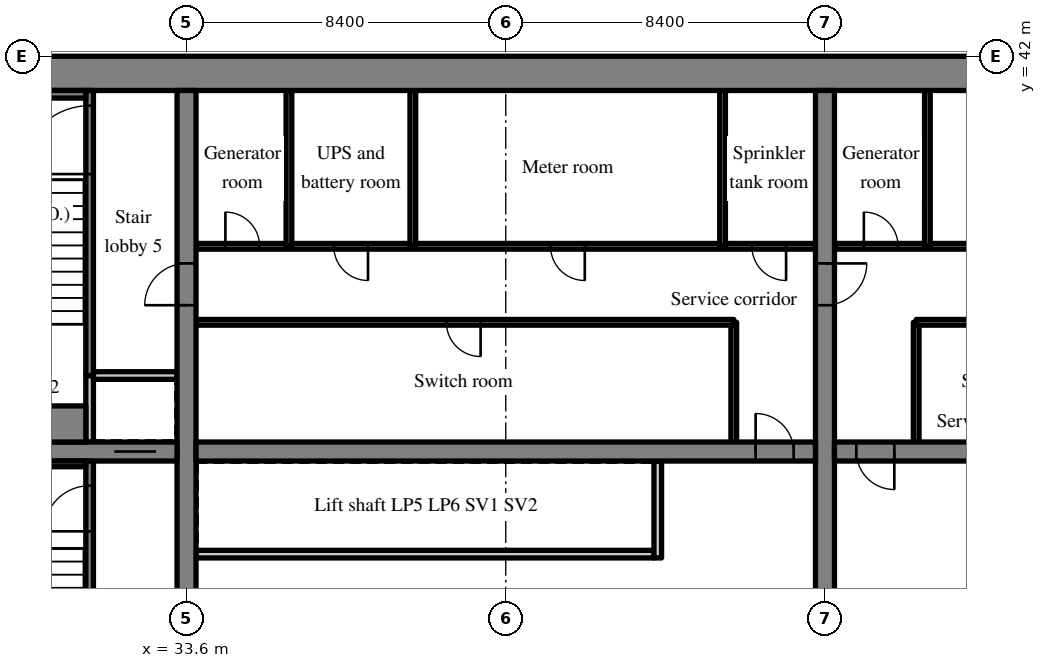
"""IFC4 building model, lengths in metres.
Left out: names, types, materials, properties, quantities, classifications, styles, units other than length and angle.
Written with IfcOpenShell. Run it as: python <this file> out.ifc"""

import sys

from ifc_helpers import new_model, si_unit, direction, frame, frame_2d, origin, place, context, subcontext, project, spatial, rectangle, extrude, source, transform, mapped, element, fill, save


model = new_model("IFC4")
c1 = context("Model", 3, precision=1e-05, world=origin(), true_north=direction((0.0, 1.0)))
c2 = subcontext(c1, "Body", "Model", "MODEL_VIEW")
j1 = project(units=[si_unit("LENGTHUNIT", "METRE"), si_unit("PLANEANGLEUNIT", "RADIAN")], contexts=[c1])
p1 = place(None, origin())
s1 = spatial("IfcSite", under=j1, at=p1, CompositionType="ELEMENT")
p2 = place(p1, origin())
s2 = spatial("IfcBuilding", under=s1, at=p2, CompositionType="ELEMENT")
p3 = place(p2, frame((0.0, 0.0, 140.8)))
s3 = spatial("IfcBuildingStorey", under=s2, at=p3, CompositionType="ELEMENT", Elevation=140.8)
m1 = source(origin(), c2, "Body", "SweptSolid", [
    extrude(rectangle(XDim=50.4, YDim=0.9, at=frame_2d((25.2, 0.0))), origin(), (0.0, 0.0, 1.0), 5.12),
])
p4 = place(p3, frame((25.2, 41.55, 0.0), z_axis=(0.0, 0.0, 1.0), x_axis=(1.0, 0.0, 0.0)))
e1 = element("IfcWall", 1, at=p4, inside=s3, PredefinedType="SHEAR", context=c2, shape_type="MappedRepresentation", body=[
    mapped(m1, transform((0.0, 0.0, 0.0), scale=1.0)),
])
m2 = source(origin(), c2, "Body", "SweptSolid", [
    extrude(rectangle(XDim=18.2, YDim=0.5, at=frame_2d((9.1, 0.0))), origin(), (0.0, 0.0, 1.0), 5.12),
])
p5 = place(p3, frame((33.6, 22.9, 0.0), z_axis=(0.0, 0.0, 1.0), x_axis=(0.0, 1.0, 0.0)))
e2 = element("IfcWall", 2, at=p5, inside=s3, PredefinedType="SHEAR", context=c2, shape_type="MappedRepresentation", body=[
    mapped(m2, transform((0.0, 0.0, 0.0), scale=1.0)),
])
m3 = source(origin(), c2, "Body", "SweptSolid", [
    extrude(rectangle(XDim=1.1, YDim=2.1, at=frame_2d((0.55, 1.05))), frame((0.0, 0.26, 0.0), z_axis=(0.0, -1.0, 0.0), x_axis=(1.0, 0.0, 0.0)), (0.0, 0.0, 1.0), 0.52),
])
p6 = place(p5, frame((12.55, 0.0, 0.0)))
e3 = element("IfcOpeningElement", 3, at=p6, cuts=e2, PredefinedType="OPENING", context=c2, shape_type="MappedRepresentation", body=[
    mapped(m3, transform((0.0, 0.0, 0.0), scale=1.0)),
])
p7 = place(p3, frame((50.4, 22.9, 0.0), z_axis=(0.0, 0.0, 1.0), x_axis=(0.0, 1.0, 0.0)))
e4 = element("IfcWall", 4, at=p7, inside=s3, PredefinedType="SHEAR", context=c2, shape_type="MappedRepresentation", body=[
    mapped(m2, transform((0.0, 0.0, 0.0), scale=1.0)),
])
p8 = place(p7, frame((12.55, 0.0, 0.0)))
e5 = element("IfcOpeningElement", 5, at=p8, cuts=e4, PredefinedType="OPENING", context=c2, shape_type="MappedRepresentation", body=[
    mapped(m3, transform((0.0, 0.0, 0.0), scale=1.0)),
])
m4 = source(origin(), c2, "Body", "SweptSolid", [
    extrude(rectangle(XDim=7.25, YDim=0.5, at=frame_2d((3.625, 0.0))), origin(), (0.0, 0.0, 1.0), 5.12),
])
p9 = place(p3, frame((26.1, 31.6, 0.0), z_axis=(0.0, 0.0, 1.0), x_axis=(1.0, 0.0, 0.0)))
e6 = element("IfcWall", 6, at=p9, inside=s3, PredefinedType="SHEAR", context=c2, shape_type="MappedRepresentation", body=[
    mapped(m4, transform((0.0, 0.0, 0.0), scale=1.0)),
])
p10 = place(p9, frame((5.6, 0.0, 0.0)))
e7 = element("IfcOpeningElement", 7, at=p10, cuts=e6, PredefinedType="OPENING", context=c2, shape_type="MappedRepresentation", body=[
    mapped(m3, transform((0.0, 0.0, 0.0), scale=1.0)),
])
m5 = source(origin(), c2, "Body", "SweptSolid", [
    extrude(rectangle(XDim=16.3, YDim=0.5, at=frame_2d((8.15, 0.0))), origin(), (0.0, 0.0, 1.0), 5.12),
])
p11 = place(p3, frame((33.85, 31.6, 0.0), z_axis=(0.0, 0.0, 1.0), x_axis=(1.0, 0.0, 0.0)))
e8 = element("IfcWall", 8, at=p11, inside=s3, PredefinedType="SHEAR", context=c2, shape_type="MappedRepresentation", body=[
    mapped(m5, transform((0.0, 0.0, 0.0), scale=1.0)),
])
m6 = source(origin(), c2, "Body", "SweptSolid", [
    extrude(rectangle(XDim=1.0, YDim=2.1, at=frame_2d((0.5, 1.05))), frame((0.0, 0.26, 0.0), z_axis=(0.0, -1.0, 0.0), x_axis=(1.0, 0.0, 0.0)), (0.0, 0.0, 1.0), 0.52),
])
p12 = place(p11, frame((14.725, 0.0, 0.0)))
e9 = element("IfcOpeningElement", 9, at=p12, cuts=e8, PredefinedType="OPENING", context=c2, shape_type="MappedRepresentation", body=[
    mapped(m6, transform((0.0, 0.0, 0.0), scale=1.0)),
])
m7 = source(origin(), c2, "Body", "SweptSolid", [
    extrude(rectangle(XDim=16.3, YDim=0.5, at=frame_2d((8.15, 0.0))), origin(), (0.0, 0.0, 1.0), 5.12),
])
p13 = place(p3, frame((50.65, 31.6, 0.0), z_axis=(0.0, 0.0, 1.0), x_axis=(1.0, 0.0, 0.0)))
e10 = element("IfcWall", 10, at=p13, inside=s3, PredefinedType="SHEAR", context=c2, shape_type="MappedRepresentation", body=[
    mapped(m7, transform((0.0, 0.0, 0.0), scale=1.0)),
])
p14 = place(p13, frame((0.575, 0.0, 0.0)))
e11 = element("IfcOpeningElement", 11, at=p14, cuts=e10, PredefinedType="OPENING", context=c2, shape_type="MappedRepresentation", body=[
    mapped(m6, transform((0.0, 0.0, 0.0), scale=1.0)),
])
m8 = source(origin(), c2, "Body", "SweptSolid", [
    extrude(rectangle(XDim=12.05, YDim=0.2, at=frame_2d((6.025, 0.0))), origin(), (0.0, 0.0, 1.0), 5.12),
])
p15 = place(p3, frame((33.85, 28.9, 0.0), z_axis=(0.0, 0.0, 1.0), x_axis=(1.0, 0.0, 0.0)))
e12 = element("IfcWall", 12, at=p15, inside=s3, PredefinedType="SOLIDWALL", context=c2, shape_type="MappedRepresentation", body=[
    mapped(m8, transform((0.0, 0.0, 0.0), scale=1.0)),
])
m9 = source(origin(), c2, "Body", "SweptSolid", [
    extrude(rectangle(XDim=2.55, YDim=0.2, at=frame_2d((1.275, 0.0))), origin(), (0.0, 0.0, 1.0), 5.12),
])
p16 = place(p3, frame((46.0, 28.8, 0.0), z_axis=(0.0, 0.0, 1.0), x_axis=(0.0, 1.0, 0.0)))
e13 = element("IfcWall", 13, at=p16, inside=s3, PredefinedType="SOLIDWALL", context=c2, shape_type="MappedRepresentation", body=[
    mapped(m9, transform((0.0, 0.0, 0.0), scale=1.0)),
])
m10 = source(origin(), c2, "Body", "SweptSolid", [
    extrude(rectangle(XDim=3.15, YDim=0.15, at=frame_2d((1.575, 0.0))), origin(), (0.0, 0.0, 1.0), 5.12),
])
p17 = place(p3, frame((48.0, 31.85, 0.0), z_axis=(0.0, 0.0, 1.0), x_axis=(0.0, 1.0, 0.0)))
e14 = element("IfcWall", 14, at=p17, inside=s3, PredefinedType="PARTITIONING", context=c2, shape_type="MappedRepresentation", body=[
    mapped(m10, transform((0.0, 0.0, 0.0), scale=1.0)),
])
m11 = source(origin(), c2, "Body", "SweptSolid", [
    extrude(rectangle(XDim=14.15, YDim=0.15, at=frame_2d((7.075, 0.0))), origin(), (0.0, 0.0, 1.0), 5.12),
])
p18 = place(p3, frame((33.85, 35.0, 0.0), z_axis=(0.0, 0.0, 1.0), x_axis=(1.0, 0.0, 0.0)))
e15 = element("IfcWall", 15, at=p18, inside=s3, PredefinedType="PARTITIONING", context=c2, shape_type="MappedRepresentation", body=[
    mapped(m11, transform((0.0, 0.0, 0.0), scale=1.0)),
])
m12 = source(origin(), c2, "Body", "SweptSolid", [
    extrude(rectangle(XDim=0.9, YDim=2.1, at=frame_2d((0.45, 1.05))), frame((0.0, 0.085, 0.0), z_axis=(0.0, -1.0, 0.0), x_axis=(1.0, 0.0, 0.0)), (0.0, 0.0, 1.0), 0.17),
])
p19 = place(p18, frame((6.588, 0.0, 0.0)))
e16 = element("IfcOpeningElement", 16, at=p19, cuts=e15, PredefinedType="OPENING", context=c2, shape_type="MappedRepresentation", body=[
    mapped(m12, transform((0.0, 0.0, 0.0), scale=1.0)),
])
m13 = source(origin(), c2, "Body", "SweptSolid", [
    extrude(rectangle(XDim=16.3, YDim=0.15, at=frame_2d((8.15, 0.0))), origin(), (0.0, 0.0, 1.0), 5.12),
])
p20 = place(p3, frame((33.85, 37.0, 0.0), z_axis=(0.0, 0.0, 1.0), x_axis=(1.0, 0.0, 0.0)))
e17 = element("IfcWall", 17, at=p20, inside=s3, PredefinedType="PARTITIONING", context=c2, shape_type="MappedRepresentation", body=[
    mapped(m13, transform((0.0, 0.0, 0.0), scale=1.0)),
])
p21 = place(p20, frame((0.773, 0.0, 0.0)))
e18 = element("IfcOpeningElement", 18, at=p21, cuts=e17, PredefinedType="OPENING", context=c2, shape_type="MappedRepresentation", body=[
    mapped(m12, transform((0.0, 0.0, 0.0), scale=1.0)),
])
p22 = place(p20, frame((3.625, 0.0, 0.0)))
e19 = element("IfcOpeningElement", 19, at=p22, cuts=e17, PredefinedType="OPENING", context=c2, shape_type="MappedRepresentation", body=[
    mapped(m12, transform((0.0, 0.0, 0.0), scale=1.0)),
])
p23 = place(p20, frame((9.33, 0.0, 0.0)))
e20 = element("IfcOpeningElement", 20, at=p23, cuts=e17, PredefinedType="OPENING", context=c2, shape_type="MappedRepresentation", body=[
    mapped(m12, transform((0.0, 0.0, 0.0), scale=1.0)),
])
p24 = place(p20, frame((14.627, 0.0, 0.0)))
e21 = element("IfcOpeningElement", 21, at=p24, cuts=e17, PredefinedType="OPENING", context=c2, shape_type="MappedRepresentation", body=[
    mapped(m12, transform((0.0, 0.0, 0.0), scale=1.0)),
])
m14 = source(origin(), c2, "Body", "SweptSolid", [
    extrude(rectangle(XDim=4.1, YDim=0.15, at=frame_2d((2.05, 0.0))), origin(), (0.0, 0.0, 1.0), 5.12),
])
for number, where, z_axis, x_axis in (
    (22, (36.295, 37.0, 0.0), (0.0, 0.0, 1.0), (0.0, 1.0, 0.0)),
    (23, (39.555, 37.0, 0.0), (0.0, 0.0, 1.0), (0.0, 1.0, 0.0)),
    (24, (47.705, 37.0, 0.0), (0.0, 0.0, 1.0), (0.0, 1.0, 0.0)),
):
    element("IfcWall", number, at=place(p3, frame(where, z_axis=z_axis, x_axis=x_axis)), inside=s3, PredefinedType="PARTITIONING", context=c2, shape_type="MappedRepresentation", body=[
        mapped(m14, transform((0.0, 0.0, 0.0), scale=1.0)),
    ])
p25 = place(p3, frame((52.8, 31.85, 0.0), z_axis=(0.0, 0.0, 1.0), x_axis=(0.0, 1.0, 0.0)))
e25 = element("IfcWall", 25, at=p25, inside=s3, PredefinedType="PARTITIONING", context=c2, shape_type="MappedRepresentation", body=[
    mapped(m10, transform((0.0, 0.0, 0.0), scale=1.0)),
])
p26 = place(p3, frame((66.95, 35.0, 0.0), z_axis=(0.0, 0.0, 1.0), x_axis=(-1.0, 0.0, 0.0)))
e26 = element("IfcWall", 26, at=p26, inside=s3, PredefinedType="PARTITIONING", context=c2, shape_type="MappedRepresentation", body=[
    mapped(m11, transform((0.0, 0.0, 0.0), scale=1.0)),
])
p27 = place(p26, frame((3.421, 0.0, 0.0)))
e27 = element("IfcOpeningElement", 27, at=p27, cuts=e26, PredefinedType="OPENING", context=c2, shape_type="MappedRepresentation", body=[
    mapped(m12, transform((0.0, 0.0, 0.0), scale=1.0)),
])
p28 = place(p26, frame((10.458, 0.0, 0.0)))
e28 = element("IfcOpeningElement", 28, at=p28, cuts=e26, PredefinedType="OPENING", context=c2, shape_type="MappedRepresentation", body=[
    mapped(m12, transform((0.0, 0.0, 0.0), scale=1.0)),
])
m15 = source(origin(), c2, "Body", "SweptSolid", [
    extrude(rectangle(XDim=16.3, YDim=0.15, at=frame_2d((8.15, 0.0))), origin(), (0.0, 0.0, 1.0), 5.12),
])
p29 = place(p3, frame((66.95, 37.0, 0.0), z_axis=(0.0, 0.0, 1.0), x_axis=(-1.0, 0.0, 0.0)))
e29 = element("IfcWall", 29, at=p29, inside=s3, PredefinedType="PARTITIONING", context=c2, shape_type="MappedRepresentation", body=[
    mapped(m15, transform((0.0, 0.0, 0.0), scale=1.0)),
])
p30 = place(p29, frame((6.478, 0.0, 0.0)))
e30 = element("IfcOpeningElement", 30, at=p30, cuts=e29, PredefinedType="OPENING", context=c2, shape_type="MappedRepresentation", body=[
    mapped(m12, transform((0.0, 0.0, 0.0), scale=1.0)),
])
p31 = place(p29, frame((14.627, 0.0, 0.0)))
e31 = element("IfcOpeningElement", 31, at=p31, cuts=e29, PredefinedType="OPENING", context=c2, shape_type="MappedRepresentation", body=[
    mapped(m12, transform((0.0, 0.0, 0.0), scale=1.0)),
])
p32 = place(p3, frame((53.095, 37.0, 0.0), z_axis=(0.0, 0.0, 1.0), x_axis=(0.0, 1.0, 0.0)))
e32 = element("IfcWall", 32, at=p32, inside=s3, PredefinedType="PARTITIONING", context=c2, shape_type="MappedRepresentation", body=[
    mapped(m14, transform((0.0, 0.0, 0.0), scale=1.0)),
])
m16 = source(origin(), c2, "Body", "SweptSolid", [
    extrude(rectangle(XDim=8.45, YDim=0.2, at=frame_2d((4.225, 0.0))), origin(), (0.0, 0.0, 1.0), 5.12),
])
p33 = place(p3, frame((31.05, 22.9, 0.0), z_axis=(0.0, 0.0, 1.0), x_axis=(0.0, 1.0, 0.0)))
e33 = element("IfcWall", 33, at=p33, inside=s3, PredefinedType="SOLIDWALL", context=c2, shape_type="MappedRepresentation", body=[
    mapped(m16, transform((0.0, 0.0, 0.0), scale=1.0)),
])
m17 = source(origin(), c2, "Body", "SweptSolid", [
    extrude(rectangle(XDim=1.2, YDim=2.1, at=frame_2d((0.6, 1.05))), frame((0.0, 0.11, 0.0), z_axis=(0.0, -1.0, 0.0), x_axis=(1.0, 0.0, 0.0)), (0.0, 0.0, 1.0), 0.22),
])
p34 = place(p33, frame((6.6, 0.0, 0.0)))
e34 = element("IfcOpeningElement", 34, at=p34, cuts=e33, PredefinedType="OPENING", context=c2, shape_type="MappedRepresentation", body=[
    mapped(m17, transform((0.0, 0.0, 0.0), scale=1.0)),
])
m18 = source(origin(), c2, "Body", "SweptSolid", [
    extrude(rectangle(XDim=1.75, YDim=0.2, at=frame_2d((0.875, 0.0))), origin(), (0.0, 0.0, 1.0), 5.12),
])
p35 = place(p3, frame((31.05, 31.85, 0.0), z_axis=(0.0, 0.0, 1.0), x_axis=(0.0, 1.0, 0.0)))
e35 = element("IfcWall", 35, at=p35, inside=s3, PredefinedType="SOLIDWALL", context=c2, shape_type="MappedRepresentation", body=[
    mapped(m18, transform((0.0, 0.0, 0.0), scale=1.0)),
])
m19 = source(origin(), c2, "Body", "SweptSolid", [
    extrude(rectangle(XDim=2.2, YDim=0.2, at=frame_2d((1.1, 0.0))), origin(), (0.0, 0.0, 1.0), 5.12),
])
p36 = place(p3, frame((31.15, 33.6, 0.0), z_axis=(0.0, 0.0, 1.0), x_axis=(1.0, 0.0, 0.0)))
e36 = element("IfcWall", 36, at=p36, inside=s3, PredefinedType="SOLIDWALL", context=c2, shape_type="MappedRepresentation", body=[
    mapped(m19, transform((0.0, 0.0, 0.0), scale=1.0)),
])
m20 = source(origin(), c2, "Body", "SweptSolid", [
    extrude(rectangle(XDim=7.5, YDim=0.2, at=frame_2d((3.75, 0.0))), origin(), (0.0, 0.0, 1.0), 5.12),
])
p37 = place(p3, frame((31.05, 33.6, 0.0), z_axis=(0.0, 0.0, 1.0), x_axis=(0.0, 1.0, 0.0)))
e37 = element("IfcWall", 37, at=p37, inside=s3, PredefinedType="SOLIDWALL", context=c2, shape_type="MappedRepresentation", body=[
    mapped(m20, transform((0.0, 0.0, 0.0), scale=1.0)),
])
m21 = source(origin(), c2, "Body", "SweptSolid", [
    extrude(rectangle(XDim=1.8, YDim=2.1, at=frame_2d((0.9, 1.05))), frame((0.0, 0.11, 0.0), z_axis=(0.0, -1.0, 0.0), x_axis=(1.0, 0.0, 0.0)), (0.0, 0.0, 1.0), 0.22),
])
p38 = place(p37, frame((5.3, 0.0, 0.0)))
e38 = element("IfcOpeningElement", 38, at=p38, cuts=e37, PredefinedType="OPENING", context=c2, shape_type="MappedRepresentation", body=[
    mapped(m21, transform((0.0, 0.0, 0.0), scale=1.0)),
])
m22 = source(origin(), c2, "Body", "SweptSolid", [
    extrude(rectangle(XDim=4.85, YDim=0.15, at=frame_2d((2.425, 0.0))), origin(), (0.0, 0.0, 1.0), 5.12),
])
p39 = place(p3, frame((26.1, 31.275, 0.0), z_axis=(0.0, 0.0, 1.0), x_axis=(1.0, 0.0, 0.0)))
e39 = element("IfcWall", 39, at=p39, inside=s3, PredefinedType="SOLIDWALL", context=c2, shape_type="MappedRepresentation", body=[
    mapped(m22, transform((0.0, 0.0, 0.0), scale=1.0)),
])
m23 = source(origin(), c2, "Body", "SweptSolid", [
    extrude(rectangle(XDim=4.85, YDim=0.2, at=frame_2d((2.425, 0.0))), origin(), (0.0, 0.0, 1.0), 5.12),
])
p40 = place(p3, frame((26.1, 41.0, 0.0), z_axis=(0.0, 0.0, 1.0), x_axis=(1.0, 0.0, 0.0)))
e40 = element("IfcWall", 40, at=p40, inside=s3, PredefinedType="SOLIDWALL", context=c2, shape_type="MappedRepresentation", body=[
    mapped(m23, transform((0.0, 0.0, 0.0), scale=1.0)),
])
m24 = source(origin(), c2, "Body", "SweptSolid", [
    extrude(rectangle(XDim=4.85, YDim=0.95, at=frame_2d((2.425, 0.0))), origin(), (0.0, 0.0, 1.0), 5.12),
])
p41 = place(p3, frame((26.1, 32.325, 0.0), z_axis=(0.0, 0.0, 1.0), x_axis=(1.0, 0.0, 0.0)))
e41 = element("IfcWall", 41, at=p41, inside=s3, PredefinedType="SOLIDWALL", context=c2, shape_type="MappedRepresentation", body=[
    mapped(m24, transform((0.0, 0.0, 0.0), scale=1.0)),
])
m25 = source(origin(), c2, "Body", "SweptSolid", [
    extrude(rectangle(XDim=1.0, YDim=2.1, at=frame_2d((0.5, 1.05))), frame((0.0, 0.025, 0.0), z_axis=(0.0, -1.0, 0.0), x_axis=(1.0, 0.0, 0.0)), (0.0, 0.0, 1.0), 0.05),
])
p42 = place(p12, origin())
e42 = element("IfcDoor", 42, at=p42, inside=s3, OperationType="SINGLE_SWING_LEFT", PredefinedType="DOOR", context=c2, shape_type="MappedRepresentation", body=[
    mapped(m25, transform((0.0, 0.0, 0.0), scale=1.0)),
])
fill(e9, e42)
m26 = source(origin(), c2, "Body", "SweptSolid", [
    extrude(rectangle(XDim=0.9, YDim=2.1, at=frame_2d((0.45, 1.05))), frame((0.0, 0.025, 0.0), z_axis=(0.0, -1.0, 0.0), x_axis=(1.0, 0.0, 0.0)), (0.0, 0.0, 1.0), 0.05),
])
p43 = place(p19, origin())
e43 = element("IfcDoor", 43, at=p43, inside=s3, OperationType="SINGLE_SWING_RIGHT", PredefinedType="DOOR", context=c2, shape_type="MappedRepresentation", body=[
    mapped(m26, transform((0.0, 0.0, 0.0), scale=1.0)),
])
fill(e16, e43)
p44 = place(p21, origin())
e44 = element("IfcDoor", 44, at=p44, inside=s3, OperationType="SINGLE_SWING_LEFT", PredefinedType="DOOR", context=c2, shape_type="MappedRepresentation", body=[
    mapped(m26, transform((0.0, 0.0, 0.0), scale=1.0)),
])
fill(e18, e44)
p45 = place(p22, origin())
e45 = element("IfcDoor", 45, at=p45, inside=s3, OperationType="SINGLE_SWING_RIGHT", PredefinedType="DOOR", context=c2, shape_type="MappedRepresentation", body=[
    mapped(m26, transform((0.0, 0.0, 0.0), scale=1.0)),
])
fill(e19, e45)
p46 = place(p23, origin())
e46 = element("IfcDoor", 46, at=p46, inside=s3, OperationType="SINGLE_SWING_RIGHT", PredefinedType="DOOR", context=c2, shape_type="MappedRepresentation", body=[
    mapped(m26, transform((0.0, 0.0, 0.0), scale=1.0)),
])
fill(e20, e46)
p47 = place(p24, origin())
e47 = element("IfcDoor", 47, at=p47, inside=s3, OperationType="SINGLE_SWING_RIGHT", PredefinedType="DOOR", context=c2, shape_type="MappedRepresentation", body=[
    mapped(m26, transform((0.0, 0.0, 0.0), scale=1.0)),
])
fill(e21, e47)
p48 = place(p14, origin())
e48 = element("IfcDoor", 48, at=p48, inside=s3, OperationType="SINGLE_SWING_RIGHT", PredefinedType="DOOR", context=c2, shape_type="MappedRepresentation", body=[
    mapped(m25, transform((0.0, 0.0, 0.0), scale=1.0)),
])
fill(e11, e48)
p49 = place(p31, origin())
e49 = element("IfcDoor", 49, at=p49, inside=s3, OperationType="SINGLE_SWING_RIGHT", PredefinedType="DOOR", context=c2, shape_type="MappedRepresentation", body=[
    mapped(m26, transform((0.0, 0.0, 0.0), scale=1.0)),
])
fill(e31, e49)
m27 = source(origin(), c2, "Body", "SweptSolid", [
    extrude(rectangle(XDim=1.2, YDim=2.1, at=frame_2d((0.6, 1.05))), frame((0.0, 0.025, 0.0), z_axis=(0.0, -1.0, 0.0), x_axis=(1.0, 0.0, 0.0)), (0.0, 0.0, 1.0), 0.05),
])
p50 = place(p34, origin())
e50 = element("IfcDoor", 50, at=p50, inside=s3, OperationType="SINGLE_SWING_LEFT", PredefinedType="DOOR", context=c2, shape_type="MappedRepresentation", body=[
    mapped(m27, transform((0.0, 0.0, 0.0), scale=1.0)),
])
fill(e34, e50)
m28 = source(origin(), c2, "Body", "SweptSolid", [
    extrude(rectangle(XDim=1.1, YDim=2.1, at=frame_2d((0.55, 1.05))), frame((0.0, 0.025, 0.0), z_axis=(0.0, -1.0, 0.0), x_axis=(1.0, 0.0, 0.0)), (0.0, 0.0, 1.0), 0.05),
])
p51 = place(p10, origin())
e51 = element("IfcDoor", 51, at=p51, inside=s3, OperationType="SLIDING_TO_RIGHT", PredefinedType="DOOR", context=c2, shape_type="MappedRepresentation", body=[
    mapped(m28, transform((0.0, 0.0, 0.0), scale=1.0)),
])
fill(e7, e51)
m29 = source(origin(), c2, "Body", "SweptSolid", [
    extrude(rectangle(XDim=1.8, YDim=2.1, at=frame_2d((0.9, 1.05))), frame((0.0, 0.025, 0.0), z_axis=(0.0, -1.0, 0.0), x_axis=(1.0, 0.0, 0.0)), (0.0, 0.0, 1.0), 0.05),
])
p52 = place(p38, origin())
e52 = element("IfcDoor", 52, at=p52, inside=s3, OperationType="SINGLE_SWING_LEFT", PredefinedType="DOOR", context=c2, shape_type="MappedRepresentation", body=[
    mapped(m29, transform((0.0, 0.0, 0.0), scale=1.0)),
])
fill(e38, e52)
p53 = place(p6, origin())
e53 = element("IfcDoor", 53, at=p53, inside=s3, OperationType="SINGLE_SWING_LEFT", PredefinedType="DOOR", context=c2, shape_type="MappedRepresentation", body=[
    mapped(m28, transform((0.0, 0.0, 0.0), scale=1.0)),
])
fill(e3, e53)
p54 = place(p8, origin())
e54 = element("IfcDoor", 54, at=p54, inside=s3, OperationType="SINGLE_SWING_RIGHT", PredefinedType="DOOR", context=c2, shape_type="MappedRepresentation", body=[
    mapped(m28, transform((0.0, 0.0, 0.0), scale=1.0)),
])
fill(e5, e54)
save(model, sys.argv[1])
